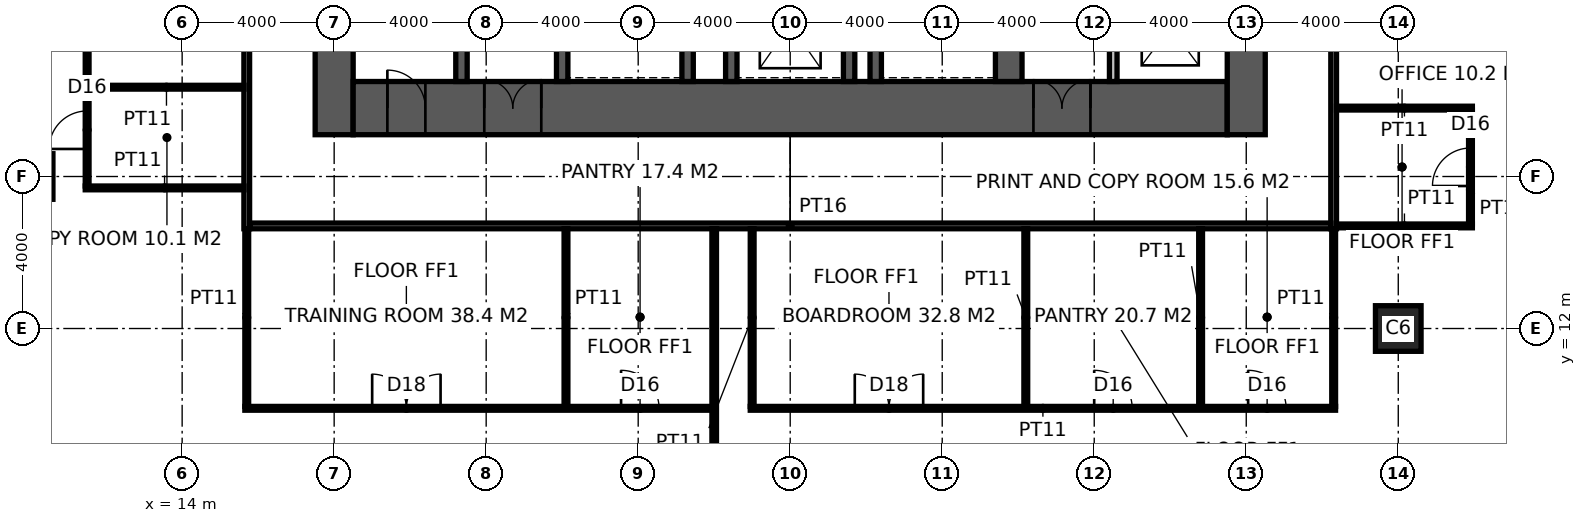
"""IFC4 building model, lengths in metres.
Left out: names, types, materials, properties, quantities, classifications, styles, units other than length and angle.
Written with IfcOpenShell. Run it as: python <this file> out.ifc"""

import sys

from ifc_helpers import new_model, si_unit, direction, frame, frame_2d, origin, origin_2d, place, context, subcontext, project, spatial, rectangle, hollow_rectangle, extrude, element, fill, save


model = new_model("IFC4")
c1 = context("Model", 3, precision=1e-05, world=origin(), true_north=direction((0.0, 1.0)))
c2 = subcontext(c1, "Body", "Model", "MODEL_VIEW")
j1 = project(units=[si_unit("LENGTHUNIT", "METRE"), si_unit("PLANEANGLEUNIT", "RADIAN")], contexts=[c1])
p1 = place(None, origin())
s1 = spatial("IfcSite", under=j1, at=p1, CompositionType="ELEMENT")
p2 = place(p1, origin())
s2 = spatial("IfcBuilding", under=s1, at=p2, CompositionType="ELEMENT")
p3 = place(p2, frame((0.0, 0.0, 39.0)))
s3 = spatial("IfcBuildingStorey", under=s2, at=p3, CompositionType="ELEMENT", Elevation=39.0)
for number, where, z_axis, x_axis in (
    (1, (10.0, 16.0, 0.0), (0.0, 0.0, 1.0), (1.0, 0.0, 0.0)),
    (2, (46.0, 12.0, 0.0), (0.0, 0.0, 1.0), (1.0, 0.0, 0.0)),
):
    element("IfcColumn", number, at=place(p3, frame(where, z_axis=z_axis, x_axis=x_axis)), inside=s3, PredefinedType="COLUMN", context=c2, shape_type="SweptSolid", body=[
        extrude(hollow_rectangle(XDim=1.2, YDim=1.2, WallThickness=0.125, at=origin_2d()), origin(), (0.0, 0.0, 1.0), 4.0),
    ])
p4 = place(p3, frame((18.0, 17.1, -0.15), z_axis=(0.0, 0.0, 1.0), x_axis=(0.0, 1.0, 0.0)))
e3 = element("IfcWall", 3, at=p4, inside=s3, PredefinedType="SHEAR", context=c2, shape_type="SweptSolid", body=[
    extrude(rectangle(XDim=19.8, YDim=1.0, at=frame_2d((9.9, 0.0))), origin(), (0.0, 0.0, 1.0), 4.0),
])
p5 = place(p3, frame((18.5, 17.8, -0.15), z_axis=(0.0, 0.0, 1.0), x_axis=(1.0, 0.0, 0.0)))
e4 = element("IfcWall", 4, at=p5, inside=s3, PredefinedType="SHEAR", context=c2, shape_type="SweptSolid", body=[
    extrude(rectangle(XDim=23.0, YDim=1.4, at=frame_2d((11.5, 0.0))), origin(), (0.0, 0.0, 1.0), 4.0),
])
p6 = place(p5, frame((3.45, 0.0, 0.15)))
e5 = element("IfcOpeningElement", 5, at=p6, cuts=e4, PredefinedType="OPENING", context=c2, shape_type="SweptSolid", body=[
    extrude(rectangle(XDim=1.5, YDim=2.4, at=frame_2d((0.75, 1.2))), frame((0.0, 0.71, 0.0), z_axis=(0.0, -1.0, 0.0), x_axis=(1.0, 0.0, 0.0)), (0.0, 0.0, 1.0), 1.42),
])
p7 = place(p5, frame((17.9, 0.0, 0.15)))
e6 = element("IfcOpeningElement", 6, at=p7, cuts=e4, PredefinedType="OPENING", context=c2, shape_type="SweptSolid", body=[
    extrude(rectangle(XDim=1.5, YDim=2.4, at=frame_2d((0.75, 1.2))), frame((0.0, 0.71, 0.0), z_axis=(0.0, -1.0, 0.0), x_axis=(1.0, 0.0, 0.0)), (0.0, 0.0, 1.0), 1.42),
])
p8 = place(p5, frame((0.9, 0.0, 0.15)))
e7 = element("IfcOpeningElement", 7, at=p8, cuts=e4, PredefinedType="OPENING", context=c2, shape_type="SweptSolid", body=[
    extrude(rectangle(XDim=1.0, YDim=2.2, at=frame_2d((0.5, 1.1))), frame((0.0, 0.71, 0.0), z_axis=(0.0, -1.0, 0.0), x_axis=(1.0, 0.0, 0.0)), (0.0, 0.0, 1.0), 1.42),
])
p9 = place(p3, frame((42.0, 17.1, -0.15), z_axis=(0.0, 0.0, 1.0), x_axis=(0.0, 1.0, 0.0)))
e8 = element("IfcWall", 8, at=p9, inside=s3, PredefinedType="SHEAR", context=c2, shape_type="SweptSolid", body=[
    extrude(rectangle(XDim=19.8, YDim=1.0, at=frame_2d((9.9, 0.0))), origin(), (0.0, 0.0, 1.0), 4.0),
])
p10 = place(p3, frame((35.75, 18.5, -0.15), z_axis=(0.0, 0.0, 1.0), x_axis=(0.0, 1.0, 0.0)))
e9 = element("IfcWall", 9, at=p10, inside=s3, PredefinedType="SHEAR", context=c2, shape_type="SweptSolid", body=[
    extrude(rectangle(XDim=17.0, YDim=0.7, at=frame_2d((8.5, 0.0))), origin(), (0.0, 0.0, 1.0), 4.0),
])
p11 = place(p10, frame((9.85, 0.0, 0.15)))
e10 = element("IfcOpeningElement", 10, at=p11, cuts=e9, PredefinedType="OPENING", context=c2, shape_type="SweptSolid", body=[
    extrude(rectangle(XDim=1.0, YDim=2.2, at=frame_2d((0.5, 1.1))), frame((0.0, 0.36, 0.0), z_axis=(0.0, -1.0, 0.0), x_axis=(1.0, 0.0, 0.0)), (0.0, 0.0, 1.0), 0.72),
])
p12 = place(p3, frame((24.0, 18.5, -0.15), z_axis=(0.0, 0.0, 1.0), x_axis=(0.0, 1.0, 0.0)))
e11 = element("IfcWall", 11, at=p12, inside=s3, PredefinedType="SHEAR", context=c2, shape_type="SweptSolid", body=[
    extrude(rectangle(XDim=17.0, YDim=0.3, at=frame_2d((8.5, 0.0))), origin(), (0.0, 0.0, 1.0), 4.0),
])
p13 = place(p12, frame((9.6, 0.0, 0.15)))
e12 = element("IfcOpeningElement", 12, at=p13, cuts=e11, PredefinedType="OPENING", context=c2, shape_type="SweptSolid", body=[
    extrude(rectangle(XDim=1.5, YDim=2.4, at=frame_2d((0.75, 1.2))), frame((0.0, 0.16, 0.0), z_axis=(0.0, -1.0, 0.0), x_axis=(1.0, 0.0, 0.0)), (0.0, 0.0, 1.0), 0.32),
])
p14 = place(p3, frame((27.3, 18.5, -0.15), z_axis=(0.0, 0.0, 1.0), x_axis=(0.0, 1.0, 0.0)))
e13 = element("IfcWall", 13, at=p14, inside=s3, PredefinedType="SHEAR", context=c2, shape_type="SweptSolid", body=[
    extrude(rectangle(XDim=7.9, YDim=0.3, at=frame_2d((3.95, 0.0))), origin(), (0.0, 0.0, 1.0), 4.0),
])
p15 = place(p14, frame((6.4, 0.0, 0.15)))
e14 = element("IfcOpeningElement", 14, at=p15, cuts=e13, PredefinedType="OPENING", context=c2, shape_type="SweptSolid", body=[
    extrude(rectangle(XDim=1.0, YDim=2.2, at=frame_2d((0.5, 1.1))), frame((0.0, 0.16, 0.0), z_axis=(0.0, -1.0, 0.0), x_axis=(1.0, 0.0, 0.0)), (0.0, 0.0, 1.0), 0.32),
])
p16 = place(p3, frame((32.25, 18.5, -0.15), z_axis=(0.0, 0.0, 1.0), x_axis=(0.0, 1.0, 0.0)))
e15 = element("IfcWall", 15, at=p16, inside=s3, PredefinedType="SHEAR", context=c2, shape_type="SweptSolid", body=[
    extrude(rectangle(XDim=7.9, YDim=0.3, at=frame_2d((3.95, 0.0))), origin(), (0.0, 0.0, 1.0), 4.0),
])
for number, where, z_axis, x_axis in (
    (16, (28.45, 18.5, -0.15), (0.0, 0.0, 1.0), (0.0, 1.0, 0.0)),
    (17, (31.55, 18.5, -0.15), (0.0, 0.0, 1.0), (0.0, 1.0, 0.0)),
):
    element("IfcWall", number, at=place(p3, frame(where, z_axis=z_axis, x_axis=x_axis)), inside=s3, PredefinedType="SHEAR", context=c2, shape_type="SweptSolid", body=[
        extrude(rectangle(XDim=2.9, YDim=0.3, at=frame_2d((1.45, 0.0))), origin(), (0.0, 0.0, 1.0), 4.0),
    ])
p17 = place(p3, frame((21.35, 18.5, -0.15), z_axis=(0.0, 0.0, 1.0), x_axis=(0.0, 1.0, 0.0)))
e18 = element("IfcWall", 18, at=p17, inside=s3, PredefinedType="SHEAR", context=c2, shape_type="SweptSolid", body=[
    extrude(rectangle(XDim=12.5, YDim=0.3, at=frame_2d((6.25, 0.0))), origin(), (0.0, 0.0, 1.0), 4.0),
])
p18 = place(p17, frame((9.575, 0.0, 0.15)))
e19 = element("IfcOpeningElement", 19, at=p18, cuts=e18, PredefinedType="OPENING", context=c2, shape_type="SweptSolid", body=[
    extrude(rectangle(XDim=1.0, YDim=2.2, at=frame_2d((0.5, 1.1))), frame((0.0, 0.16, 0.0), z_axis=(0.0, -1.0, 0.0), x_axis=(1.0, 0.0, 0.0)), (0.0, 0.0, 1.0), 0.32),
])
p19 = place(p3, frame((38.5, 18.5, -0.15), z_axis=(0.0, 0.0, 1.0), x_axis=(0.0, 1.0, 0.0)))
e20 = element("IfcWall", 20, at=p19, inside=s3, PredefinedType="SOLIDWALL", context=c2, shape_type="SweptSolid", body=[
    extrude(rectangle(XDim=11.5, YDim=0.2, at=frame_2d((5.75, 0.0))), origin(), (0.0, 0.0, 1.0), 4.0),
])
p20 = place(p19, frame((0.875, 0.0, 0.15)))
e21 = element("IfcOpeningElement", 21, at=p20, cuts=e20, PredefinedType="OPENING", context=c2, shape_type="SweptSolid", body=[
    extrude(rectangle(XDim=1.1, YDim=2.2, at=frame_2d((0.55, 1.1))), frame((0.0, 0.11, 0.0), z_axis=(0.0, -1.0, 0.0), x_axis=(1.0, 0.0, 0.0)), (0.0, 0.0, 1.0), 0.22),
])
p21 = place(p19, frame((3.825, 0.0, 0.15)))
e22 = element("IfcOpeningElement", 22, at=p21, cuts=e20, PredefinedType="OPENING", context=c2, shape_type="SweptSolid", body=[
    extrude(rectangle(XDim=1.1, YDim=2.2, at=frame_2d((0.55, 1.1))), frame((0.0, 0.11, 0.0), z_axis=(0.0, -1.0, 0.0), x_axis=(1.0, 0.0, 0.0)), (0.0, 0.0, 1.0), 0.22),
])
p22 = place(p19, frame((6.675, 0.0, 0.15)))
e23 = element("IfcOpeningElement", 23, at=p22, cuts=e20, PredefinedType="OPENING", context=c2, shape_type="SweptSolid", body=[
    extrude(rectangle(XDim=1.1, YDim=2.2, at=frame_2d((0.55, 1.1))), frame((0.0, 0.11, 0.0), z_axis=(0.0, -1.0, 0.0), x_axis=(1.0, 0.0, 0.0)), (0.0, 0.0, 1.0), 0.22),
])
p23 = place(p19, frame((9.575, 0.0, 0.15)))
e24 = element("IfcOpeningElement", 24, at=p23, cuts=e20, PredefinedType="OPENING", context=c2, shape_type="SweptSolid", body=[
    extrude(rectangle(XDim=1.1, YDim=2.2, at=frame_2d((0.55, 1.1))), frame((0.0, 0.11, 0.0), z_axis=(0.0, -1.0, 0.0), x_axis=(1.0, 0.0, 0.0)), (0.0, 0.0, 1.0), 0.22),
])
p24 = place(p3, frame((15.7, 14.625, 0.0), z_axis=(0.0, 0.0, 1.0), x_axis=(0.0, 1.0, 0.0)))
e25 = element("IfcWall", 25, at=p24, inside=s3, PredefinedType="PARTITIONING", context=c2, shape_type="SweptSolid", body=[
    extrude(rectangle(XDim=24.15, YDim=0.15, at=frame_2d((12.075, 0.0))), origin(), (0.0, 0.0, 1.0), 3.85),
])
p25 = place(p24, frame((11.175, 0.0, 0.0)))
e26 = element("IfcOpeningElement", 26, at=p25, cuts=e25, PredefinedType="OPENING", context=c2, shape_type="SweptSolid", body=[
    extrude(rectangle(XDim=1.8, YDim=2.4, at=frame_2d((0.9, 1.2))), frame((0.0, 0.085, 0.0), z_axis=(0.0, -1.0, 0.0), x_axis=(1.0, 0.0, 0.0)), (0.0, 0.0, 1.0), 0.17),
])
p26 = place(p3, frame((44.3, 14.625, 0.0), z_axis=(0.0, 0.0, 1.0), x_axis=(0.0, 1.0, 0.0)))
e27 = element("IfcWall", 27, at=p26, inside=s3, PredefinedType="PARTITIONING", context=c2, shape_type="SweptSolid", body=[
    extrude(rectangle(XDim=24.15, YDim=0.15, at=frame_2d((12.075, 0.0))), origin(), (0.0, 0.0, 1.0), 3.85),
])
p27 = place(p26, frame((10.825, 0.0, 0.0)))
e28 = element("IfcOpeningElement", 28, at=p27, cuts=e27, PredefinedType="OPENING", context=c2, shape_type="SweptSolid", body=[
    extrude(rectangle(XDim=1.8, YDim=2.4, at=frame_2d((0.9, 1.2))), frame((0.0, 0.085, 0.0), z_axis=(0.0, -1.0, 0.0), x_axis=(1.0, 0.0, 0.0)), (0.0, 0.0, 1.0), 0.17),
])
p28 = place(p3, frame((15.775, 14.7, 0.0), z_axis=(0.0, 0.0, 1.0), x_axis=(1.0, 0.0, 0.0)))
e29 = element("IfcWall", 29, at=p28, inside=s3, PredefinedType="PARTITIONING", context=c2, shape_type="SweptSolid", body=[
    extrude(rectangle(XDim=28.45, YDim=0.15, at=frame_2d((14.225, 0.0))), origin(), (0.0, 0.0, 1.0), 3.85),
])
p29 = place(p3, frame((28.0, -3.7, 0.0), z_axis=(0.0, 0.0, 1.0), x_axis=(0.0, 1.0, 0.0)))
e30 = element("IfcWall", 30, at=p29, inside=s3, PredefinedType="PARTITIONING", context=c2, shape_type="SweptSolid", body=[
    extrude(rectangle(XDim=18.325, YDim=0.12, at=frame_2d((9.163, 0.0))), origin(), (0.0, 0.0, 1.0), 3.85),
])
p30 = place(p3, frame((15.65, 9.9, 0.0), z_axis=(0.0, 0.0, 1.0), x_axis=(1.0, 0.0, 0.0)))
e31 = element("IfcWall", 31, at=p30, inside=s3, PredefinedType="PARTITIONING", context=c2, shape_type="SweptSolid", body=[
    extrude(rectangle(XDim=12.289, YDim=0.1, at=frame_2d((6.145, 0.0))), origin(), (0.0, 0.0, 1.0), 3.85),
])
p31 = place(p30, frame((3.35, 0.0, 0.0)))
e32 = element("IfcOpeningElement", 32, at=p31, cuts=e31, PredefinedType="OPENING", context=c2, shape_type="SweptSolid", body=[
    extrude(rectangle(XDim=1.8, YDim=2.4, at=frame_2d((0.9, 1.2))), frame((0.0, 0.06, 0.0), z_axis=(0.0, -1.0, 0.0), x_axis=(1.0, 0.0, 0.0)), (0.0, 0.0, 1.0), 0.12),
])
p32 = place(p30, frame((9.899, 0.0, 0.0)))
e33 = element("IfcOpeningElement", 33, at=p32, cuts=e31, PredefinedType="OPENING", context=c2, shape_type="SweptSolid", body=[
    extrude(rectangle(XDim=1.0, YDim=2.2, at=frame_2d((0.5, 1.1))), frame((0.0, 0.06, 0.0), z_axis=(0.0, -1.0, 0.0), x_axis=(1.0, 0.0, 0.0)), (0.0, 0.0, 1.0), 0.12),
])
p33 = place(p3, frame((28.949, 9.9, 0.0), z_axis=(0.0, 0.0, 1.0), x_axis=(1.0, 0.0, 0.0)))
e34 = element("IfcWall", 34, at=p33, inside=s3, PredefinedType="PARTITIONING", context=c2, shape_type="SweptSolid", body=[
    extrude(rectangle(XDim=15.401, YDim=0.1, at=frame_2d((7.701, 0.0))), origin(), (0.0, 0.0, 1.0), 3.85),
])
p34 = place(p33, frame((2.75, 0.0, 0.0)))
e35 = element("IfcOpeningElement", 35, at=p34, cuts=e34, PredefinedType="OPENING", context=c2, shape_type="SweptSolid", body=[
    extrude(rectangle(XDim=1.8, YDim=2.4, at=frame_2d((0.9, 1.2))), frame((0.0, 0.06, 0.0), z_axis=(0.0, -1.0, 0.0), x_axis=(1.0, 0.0, 0.0)), (0.0, 0.0, 1.0), 0.12),
])
p35 = place(p33, frame((9.05, 0.0, 0.0)))
e36 = element("IfcOpeningElement", 36, at=p35, cuts=e34, PredefinedType="OPENING", context=c2, shape_type="SweptSolid", body=[
    extrude(rectangle(XDim=1.0, YDim=2.2, at=frame_2d((0.5, 1.1))), frame((0.0, 0.06, 0.0), z_axis=(0.0, -1.0, 0.0), x_axis=(1.0, 0.0, 0.0)), (0.0, 0.0, 1.0), 0.12),
])
p36 = place(p33, frame((13.101, 0.0, 0.0)))
e37 = element("IfcOpeningElement", 37, at=p36, cuts=e34, PredefinedType="OPENING", context=c2, shape_type="SweptSolid", body=[
    extrude(rectangle(XDim=1.0, YDim=2.2, at=frame_2d((0.5, 1.1))), frame((0.0, 0.06, 0.0), z_axis=(0.0, -1.0, 0.0), x_axis=(1.0, 0.0, 0.0)), (0.0, 0.0, 1.0), 0.12),
])
p37 = place(p3, frame((44.375, 14.7, 0.0), z_axis=(0.0, 0.0, 1.0), x_axis=(1.0, 0.0, 0.0)))
e38 = element("IfcWall", 38, at=p37, inside=s3, PredefinedType="PARTITIONING", context=c2, shape_type="SweptSolid", body=[
    extrude(rectangle(XDim=3.575, YDim=0.1, at=frame_2d((1.788, 0.0))), origin(), (0.0, 0.0, 1.0), 3.85),
])
p38 = place(p3, frame((11.45, 15.7, 0.0), z_axis=(0.0, 0.0, 1.0), x_axis=(1.0, 0.0, 0.0)))
e39 = element("IfcWall", 39, at=p38, inside=s3, PredefinedType="PARTITIONING", context=c2, shape_type="SweptSolid", body=[
    extrude(rectangle(XDim=4.175, YDim=0.1, at=frame_2d((2.087, 0.0))), origin(), (0.0, 0.0, 1.0), 3.85),
])
p39 = place(p3, frame((44.375, 17.8, 0.0), z_axis=(0.0, 0.0, 1.0), x_axis=(1.0, 0.0, 0.0)))
e40 = element("IfcWall", 40, at=p39, inside=s3, PredefinedType="PARTITIONING", context=c2, shape_type="SweptSolid", body=[
    extrude(rectangle(XDim=3.575, YDim=0.1, at=frame_2d((1.788, 0.0))), origin(), (0.0, 0.0, 1.0), 3.85),
])
p40 = place(p3, frame((11.55, 18.35, 0.0), z_axis=(0.0, 0.0, 1.0), x_axis=(1.0, 0.0, 0.0)))
e41 = element("IfcWall", 41, at=p40, inside=s3, PredefinedType="PARTITIONING", context=c2, shape_type="SweptSolid", body=[
    extrude(rectangle(XDim=4.075, YDim=0.1, at=frame_2d((2.038, 0.0))), origin(), (0.0, 0.0, 1.0), 3.85),
])
p41 = place(p3, frame((11.5, 15.75, 0.0), z_axis=(0.0, 0.0, 1.0), x_axis=(0.0, 1.0, 0.0)))
e42 = element("IfcWall", 42, at=p41, inside=s3, PredefinedType="PARTITIONING", context=c2, shape_type="SweptSolid", body=[
    extrude(rectangle(XDim=8.8, YDim=0.1, at=frame_2d((4.4, 0.0))), origin(), (0.0, 0.0, 1.0), 3.85),
])
p42 = place(p41, frame((0.975, 0.0, 0.0)))
e43 = element("IfcOpeningElement", 43, at=p42, cuts=e42, PredefinedType="OPENING", context=c2, shape_type="SweptSolid", body=[
    extrude(rectangle(XDim=1.0, YDim=2.2, at=frame_2d((0.5, 1.1))), frame((0.0, 0.06, 0.0), z_axis=(0.0, -1.0, 0.0), x_axis=(1.0, 0.0, 0.0)), (0.0, 0.0, 1.0), 0.12),
])
p43 = place(p41, frame((3.65, 0.0, 0.0)))
e44 = element("IfcOpeningElement", 44, at=p43, cuts=e42, PredefinedType="OPENING", context=c2, shape_type="SweptSolid", body=[
    extrude(rectangle(XDim=1.0, YDim=2.2, at=frame_2d((0.5, 1.1))), frame((0.0, 0.06, 0.0), z_axis=(0.0, -1.0, 0.0), x_axis=(1.0, 0.0, 0.0)), (0.0, 0.0, 1.0), 0.12),
])
p44 = place(p41, frame((6.525, 0.0, 0.0)))
e45 = element("IfcOpeningElement", 45, at=p44, cuts=e42, PredefinedType="OPENING", context=c2, shape_type="SweptSolid", body=[
    extrude(rectangle(XDim=1.0, YDim=2.2, at=frame_2d((0.5, 1.1))), frame((0.0, 0.06, 0.0), z_axis=(0.0, -1.0, 0.0), x_axis=(1.0, 0.0, 0.0)), (0.0, 0.0, 1.0), 0.12),
])
for number, where, z_axis, x_axis in (
    (46, (15.7, 9.95, 0.0), (0.0, 0.0, 1.0), (0.0, 1.0, 0.0)),
    (47, (24.1, 9.95, 0.0), (0.0, 0.0, 1.0), (0.0, 1.0, 0.0)),
    (48, (28.999, 9.95, 0.0), (0.0, 0.0, 1.0), (0.0, 1.0, 0.0)),
    (49, (36.199, 9.95, 0.0), (0.0, 0.0, 1.0), (0.0, 1.0, 0.0)),
    (50, (40.799, 9.95, 0.0), (0.0, 0.0, 1.0), (0.0, 1.0, 0.0)),
    (51, (44.3, 9.95, 0.0), (0.0, 0.0, 1.0), (0.0, 1.0, 0.0)),
):
    element("IfcWall", number, at=place(p3, frame(where, z_axis=z_axis, x_axis=x_axis)), inside=s3, PredefinedType="PARTITIONING", context=c2, shape_type="SweptSolid", body=[
        extrude(rectangle(XDim=4.675, YDim=0.1, at=frame_2d((2.337, 0.0))), origin(), (0.0, 0.0, 1.0), 3.85),
    ])
p45 = place(p3, frame((47.9, 14.75, 0.0), z_axis=(0.0, 0.0, 1.0), x_axis=(0.0, 1.0, 0.0)))
e52 = element("IfcWall", 52, at=p45, inside=s3, PredefinedType="PARTITIONING", context=c2, shape_type="SweptSolid", body=[
    extrude(rectangle(XDim=3.0, YDim=0.1, at=frame_2d((1.5, 0.0))), origin(), (0.0, 0.0, 1.0), 3.85),
])
p46 = place(p45, frame((1.0, 0.0, 0.0)))
e53 = element("IfcOpeningElement", 53, at=p46, cuts=e52, PredefinedType="OPENING", context=c2, shape_type="SweptSolid", body=[
    extrude(rectangle(XDim=1.0, YDim=2.2, at=frame_2d((0.5, 1.1))), frame((0.0, 0.06, 0.0), z_axis=(0.0, -1.0, 0.0), x_axis=(1.0, 0.0, 0.0)), (0.0, 0.0, 1.0), 0.12),
])
p47 = place(p6, origin())
e54 = element("IfcDoor", 54, at=p47, inside=s3, OperationType="DOUBLE_DOOR_DOUBLE_SWING", PredefinedType="DOOR", context=c2, shape_type="SweptSolid", body=[
    extrude(rectangle(XDim=1.5, YDim=2.4, at=frame_2d((0.75, 1.2))), frame((0.0, 0.025, 0.0), z_axis=(0.0, -1.0, 0.0), x_axis=(1.0, 0.0, 0.0)), (0.0, 0.0, 1.0), 0.05),
])
fill(e5, e54)
p48 = place(p7, origin())
e55 = element("IfcDoor", 55, at=p48, inside=s3, OperationType="DOUBLE_DOOR_DOUBLE_SWING", PredefinedType="DOOR", context=c2, shape_type="SweptSolid", body=[
    extrude(rectangle(XDim=1.5, YDim=2.4, at=frame_2d((0.75, 1.2))), frame((0.0, 0.025, 0.0), z_axis=(0.0, -1.0, 0.0), x_axis=(1.0, 0.0, 0.0)), (0.0, 0.0, 1.0), 0.05),
])
fill(e6, e55)
p49 = place(p8, origin())
e56 = element("IfcDoor", 56, at=p49, inside=s3, OperationType="SINGLE_SWING_LEFT", PredefinedType="DOOR", context=c2, shape_type="SweptSolid", body=[
    extrude(rectangle(XDim=1.0, YDim=2.2, at=frame_2d((0.5, 1.1))), frame((0.0, 0.025, 0.0), z_axis=(0.0, -1.0, 0.0), x_axis=(1.0, 0.0, 0.0)), (0.0, 0.0, 1.0), 0.05),
])
fill(e7, e56)
p50 = place(p31, origin())
e57 = element("IfcDoor", 57, at=p50, inside=s3, OperationType="DOUBLE_DOOR_DOUBLE_SWING", PredefinedType="DOOR", context=c2, shape_type="SweptSolid", body=[
    extrude(rectangle(XDim=1.8, YDim=2.4, at=frame_2d((0.9, 1.2))), frame((0.0, 0.025, 0.0), z_axis=(0.0, -1.0, 0.0), x_axis=(1.0, 0.0, 0.0)), (0.0, 0.0, 1.0), 0.05),
])
fill(e32, e57)
p51 = place(p32, origin())
e58 = element("IfcDoor", 58, at=p51, inside=s3, OperationType="SINGLE_SWING_LEFT", PredefinedType="DOOR", context=c2, shape_type="SweptSolid", body=[
    extrude(rectangle(XDim=1.0, YDim=2.2, at=frame_2d((0.5, 1.1))), frame((0.0, 0.025, 0.0), z_axis=(0.0, -1.0, 0.0), x_axis=(1.0, 0.0, 0.0)), (0.0, 0.0, 1.0), 0.05),
])
fill(e33, e58)
p52 = place(p42, origin())
e59 = element("IfcDoor", 59, at=p52, inside=s3, OperationType="SINGLE_SWING_LEFT", PredefinedType="DOOR", context=c2, shape_type="SweptSolid", body=[
    extrude(rectangle(XDim=1.0, YDim=2.2, at=frame_2d((0.5, 1.1))), frame((0.0, 0.025, 0.0), z_axis=(0.0, -1.0, 0.0), x_axis=(1.0, 0.0, 0.0)), (0.0, 0.0, 1.0), 0.05),
])
fill(e43, e59)
p53 = place(p34, origin())
e60 = element("IfcDoor", 60, at=p53, inside=s3, OperationType="DOUBLE_DOOR_DOUBLE_SWING", PredefinedType="DOOR", context=c2, shape_type="SweptSolid", body=[
    extrude(rectangle(XDim=1.8, YDim=2.4, at=frame_2d((0.9, 1.2))), frame((0.0, 0.025, 0.0), z_axis=(0.0, -1.0, 0.0), x_axis=(1.0, 0.0, 0.0)), (0.0, 0.0, 1.0), 0.05),
])
fill(e35, e60)
p54 = place(p35, origin())
e61 = element("IfcDoor", 61, at=p54, inside=s3, OperationType="SINGLE_SWING_LEFT", PredefinedType="DOOR", context=c2, shape_type="SweptSolid", body=[
    extrude(rectangle(XDim=1.0, YDim=2.2, at=frame_2d((0.5, 1.1))), frame((0.0, 0.025, 0.0), z_axis=(0.0, -1.0, 0.0), x_axis=(1.0, 0.0, 0.0)), (0.0, 0.0, 1.0), 0.05),
])
fill(e36, e61)
p55 = place(p36, origin())
e62 = element("IfcDoor", 62, at=p55, inside=s3, OperationType="SINGLE_SWING_LEFT", PredefinedType="DOOR", context=c2, shape_type="SweptSolid", body=[
    extrude(rectangle(XDim=1.0, YDim=2.2, at=frame_2d((0.5, 1.1))), frame((0.0, 0.025, 0.0), z_axis=(0.0, -1.0, 0.0), x_axis=(1.0, 0.0, 0.0)), (0.0, 0.0, 1.0), 0.05),
])
fill(e37, e62)
p56 = place(p46, origin())
e63 = element("IfcDoor", 63, at=p56, inside=s3, OperationType="SINGLE_SWING_LEFT", PredefinedType="DOOR", context=c2, shape_type="SweptSolid", body=[
    extrude(rectangle(XDim=1.0, YDim=2.2, at=frame_2d((0.5, 1.1))), frame((0.0, 0.025, 0.0), z_axis=(0.0, -1.0, 0.0), x_axis=(1.0, 0.0, 0.0)), (0.0, 0.0, 1.0), 0.05),
])
fill(e53, e63)
save(model, sys.argv[1])
